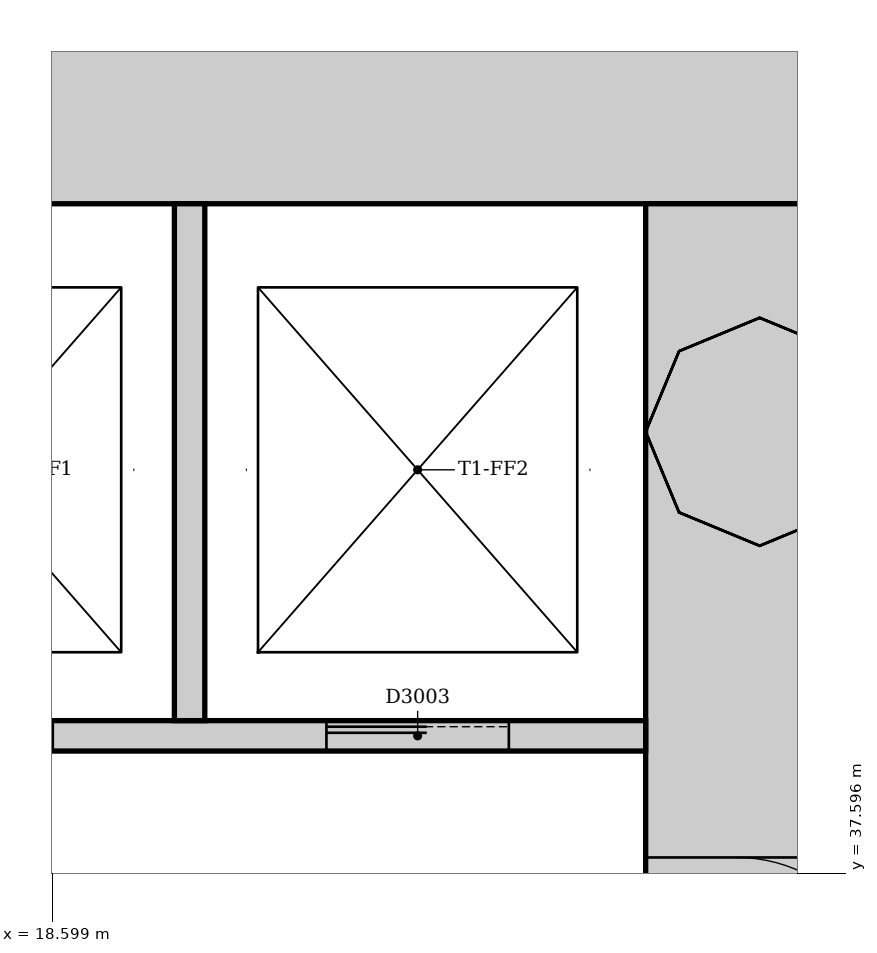
"""IFC4 building model, lengths in metres.
Left out: names, types, materials, properties, quantities, classifications, styles, units other than length and angle.
Written with IfcOpenShell. Run it as: python <this file> out.ifc"""

import sys

from ifc_helpers import new_model, si_unit, direction, frame, frame_2d, origin, place, context, subcontext, project, spatial, rectangle, extrude, element, fill, save


model = new_model("IFC4")
c1 = context("Model", 3, precision=1e-05, world=origin(), true_north=direction((0.0, 1.0)))
c2 = subcontext(c1, "Body", "Model", "MODEL_VIEW")
j1 = project(units=[si_unit("LENGTHUNIT", "METRE"), si_unit("PLANEANGLEUNIT", "RADIAN")], contexts=[c1])
p1 = place(None, origin())
s1 = spatial("IfcSite", under=j1, at=p1, CompositionType="ELEMENT")
p2 = place(p1, origin())
s2 = spatial("IfcBuilding", under=s1, at=p2, CompositionType="ELEMENT")
p3 = place(p2, frame((0.0, 0.0, -14.0)))
s3 = spatial("IfcBuildingStorey", under=s2, at=p3, CompositionType="ELEMENT", Elevation=-14.0)
p4 = place(p3, frame((23.7, 42.6, 0.0), z_axis=(0.0, 0.0, 1.0), x_axis=(-1.0, 0.0, 0.0)))
e1 = element("IfcWall", 1, at=p4, inside=s3, PredefinedType="SOLIDWALL", context=c2, shape_type="SweptSolid", body=[
    extrude(rectangle(XDim=19.8, YDim=1.2, at=frame_2d((9.9, 0.0))), origin(), (0.0, 0.0, 1.0), 4.5),
])
p5 = place(p3, frame((23.1, 31.5, 0.0), z_axis=(0.0, 0.0, 1.0), x_axis=(0.0, 1.0, 0.0)))
e2 = element("IfcWall", 2, at=p5, inside=s3, PredefinedType="SOLIDWALL", context=c2, shape_type="SweptSolid", body=[
    extrude(rectangle(XDim=10.5, YDim=1.2, at=frame_2d((5.25, 0.0))), origin(), (0.0, 0.0, 1.0), 4.5),
])
p6 = place(p5, frame((3.15, 0.0, 0.0)))
e3 = element("IfcOpeningElement", 3, at=p6, cuts=e2, PredefinedType="OPENING", context=c2, shape_type="SweptSolid", body=[
    extrude(rectangle(XDim=1.0, YDim=2.1, at=frame_2d((0.5, 1.05))), frame((0.0, 0.61, 0.0), z_axis=(0.0, -1.0, 0.0), x_axis=(1.0, 0.0, 0.0)), (0.0, 0.0, 1.0), 1.22),
])
p7 = place(p5, frame((5.2, 0.0, 0.0)))
e4 = element("IfcOpeningElement", 4, at=p7, cuts=e2, PredefinedType="OPENING", context=c2, shape_type="SweptSolid", body=[
    extrude(rectangle(XDim=1.0, YDim=2.1, at=frame_2d((0.5, 1.05))), frame((0.0, 0.61, 0.0), z_axis=(0.0, -1.0, 0.0), x_axis=(1.0, 0.0, 0.0)), (0.0, 0.0, 1.0), 1.22),
])
p8 = place(p3, frame((16.4, 38.5, 0.0), z_axis=(0.0, 0.0, 1.0), x_axis=(1.0, 0.0, 0.0)))
e5 = element("IfcWall", 5, at=p8, inside=s3, PredefinedType="PARTITIONING", context=c2, shape_type="SweptSolid", body=[
    extrude(rectangle(XDim=6.1, YDim=0.2, at=frame_2d((3.05, 0.0))), origin(), (0.0, 0.0, 1.0), 4.15),
])
p9 = place(p8, frame((1.0, 0.0, 0.0)))
e6 = element("IfcOpeningElement", 6, at=p9, cuts=e5, PredefinedType="OPENING", context=c2, shape_type="SweptSolid", body=[
    extrude(rectangle(XDim=1.2, YDim=2.1, at=frame_2d((0.6, 1.05))), frame((0.0, 0.11, 0.0), z_axis=(0.0, -1.0, 0.0), x_axis=(1.0, 0.0, 0.0)), (0.0, 0.0, 1.0), 0.22),
])
p10 = place(p8, frame((4.0, 0.0, 0.0)))
e7 = element("IfcOpeningElement", 7, at=p10, cuts=e5, PredefinedType="OPENING", context=c2, shape_type="SweptSolid", body=[
    extrude(rectangle(XDim=1.2, YDim=2.1, at=frame_2d((0.6, 1.05))), frame((0.0, 0.11, 0.0), z_axis=(0.0, -1.0, 0.0), x_axis=(1.0, 0.0, 0.0)), (0.0, 0.0, 1.0), 0.22),
])
p11 = place(p3, frame((19.5, 38.6, 0.0), z_axis=(0.0, 0.0, 1.0), x_axis=(0.0, 1.0, 0.0)))
e8 = element("IfcWall", 8, at=p11, inside=s3, PredefinedType="PARTITIONING", context=c2, shape_type="SweptSolid", body=[
    extrude(rectangle(XDim=3.4, YDim=0.2, at=frame_2d((1.7, 0.0))), origin(), (0.0, 0.0, 1.0), 4.15),
])
p12 = place(p10, origin())
e9 = element("IfcDoor", 9, at=p12, inside=s3, OperationType="SLIDING_TO_LEFT", PredefinedType="DOOR", context=c2, shape_type="SweptSolid", body=[
    extrude(rectangle(XDim=1.2, YDim=2.1, at=frame_2d((0.6, 1.05))), frame((0.0, 0.025, 0.0), z_axis=(0.0, -1.0, 0.0), x_axis=(1.0, 0.0, 0.0)), (0.0, 0.0, 1.0), 0.05),
])
fill(e7, e9)
p13 = place(p7, frame((1.0, 0.0, 0.0), z_axis=(0.0, 0.0, 1.0), x_axis=(-1.0, 0.0, 0.0)))
e10 = element("IfcDoor", 10, at=p13, inside=s3, OperationType="SINGLE_SWING_RIGHT", PredefinedType="DOOR", context=c2, shape_type="SweptSolid", body=[
    extrude(rectangle(XDim=1.0, YDim=2.1, at=frame_2d((0.5, 1.05))), frame((0.0, 0.025, 0.0), z_axis=(0.0, -1.0, 0.0), x_axis=(1.0, 0.0, 0.0)), (0.0, 0.0, 1.0), 0.05),
])
fill(e4, e10)
save(model, sys.argv[1])
